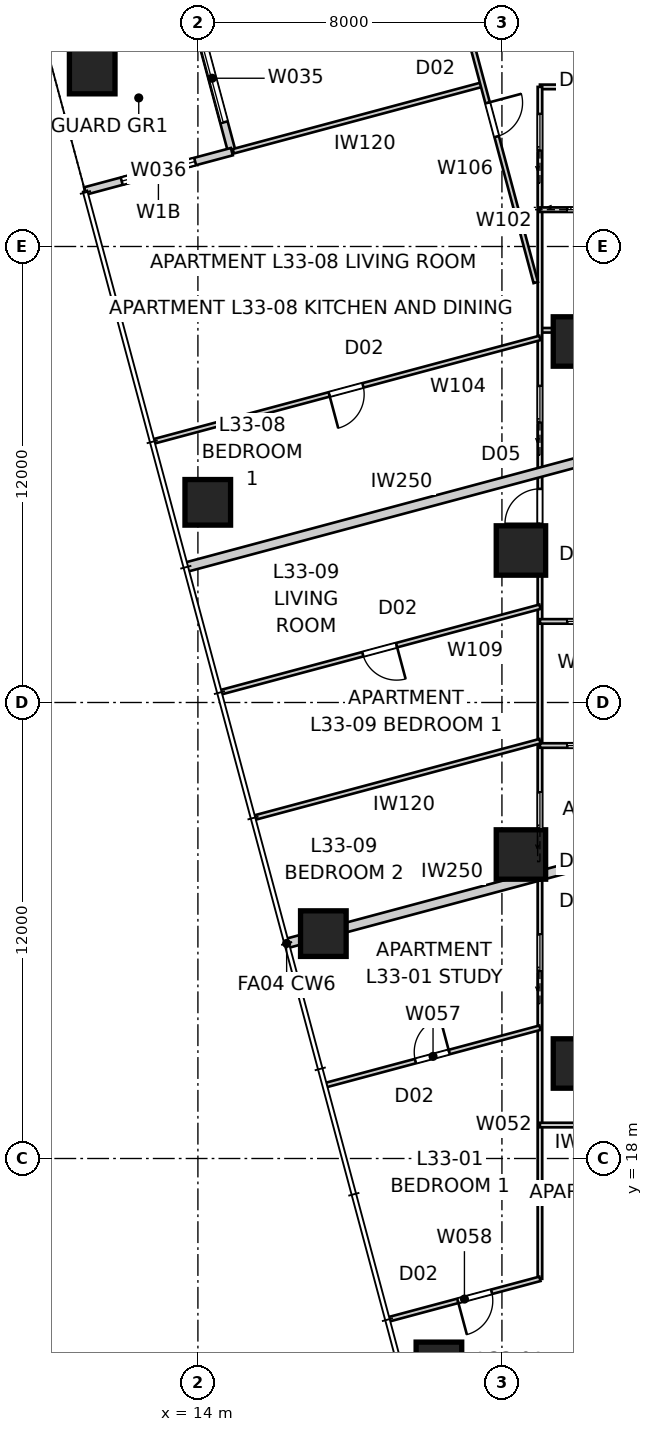
"""IFC4 building model, lengths in metres.
Left out: names, types, materials, properties, quantities, classifications, styles, units other than length and angle.
Written with IfcOpenShell. Run it as: python <this file> out.ifc"""

import sys

from ifc_helpers import new_model, si_unit, direction, frame, frame_2d, origin, origin_2d, place, context, subcontext, project, spatial, rectangle, extrude, element, fill, save


model = new_model("IFC4")
c1 = context("Model", 3, precision=1e-05, world=origin(), true_north=direction((0.0, 1.0)))
c2 = subcontext(c1, "Body", "Model", "MODEL_VIEW")
j1 = project(units=[si_unit("LENGTHUNIT", "METRE"), si_unit("PLANEANGLEUNIT", "RADIAN")], contexts=[c1])
p1 = place(None, origin())
s1 = spatial("IfcSite", under=j1, at=p1, CompositionType="ELEMENT")
p2 = place(p1, origin())
s2 = spatial("IfcBuilding", under=s1, at=p2, CompositionType="ELEMENT")
p3 = place(p2, frame((0.0, 0.0, 121.8)))
s3 = spatial("IfcBuildingStorey", under=s2, at=p3, CompositionType="ELEMENT", Elevation=121.8)
for number, where, z_axis, x_axis in (
    (1, (11.219, 46.617, 0.0), (0.0, 0.0, 1.0), (1.0, 0.0, 0.0)),
    (2, (14.26, 35.267, 0.0), (0.0, 0.0, 1.0), (1.0, 0.0, 0.0)),
    (3, (17.301, 23.918, 0.0), (0.0, 0.0, 1.0), (1.0, 0.0, 0.0)),
    (4, (20.342, 12.568, 0.0), (0.0, 0.0, 1.0), (1.0, 0.0, 0.0)),
):
    element("IfcColumn", number, at=place(p3, frame(where, z_axis=z_axis, x_axis=x_axis)), inside=s3, PredefinedType="COLUMN", context=c2, shape_type="SweptSolid", body=[
        extrude(rectangle(XDim=1.2, YDim=1.2, at=origin_2d()), origin(), (0.0, 0.0, 1.0), 3.4),
    ])
for number, where, z_axis, x_axis in (
    (5, (24.0, 39.5, 0.0), (0.0, 0.0, 1.0), (1.0, 0.0, 0.0)),
    (6, (22.5, 34.0, 0.0), (0.0, 0.0, 1.0), (1.0, 0.0, 0.0)),
    (7, (22.5, 26.0, 0.0), (0.0, 0.0, 1.0), (1.0, 0.0, 0.0)),
    (8, (24.0, 20.5, 0.0), (0.0, 0.0, 1.0), (1.0, 0.0, 0.0)),
):
    element("IfcColumn", number, at=place(p3, frame(where, z_axis=z_axis, x_axis=x_axis)), inside=s3, PredefinedType="COLUMN", context=c2, shape_type="SweptSolid", body=[
        extrude(rectangle(XDim=1.3, YDim=1.3, at=origin_2d()), origin(), (0.0, 0.0, 1.0), 3.4),
    ])
p4 = place(p3, frame((13.857, 48.359, 0.0), z_axis=(0.0, 0.0, 1.0), x_axis=(0.258843877716, -0.965919172068, 0.0)))
e9 = element("IfcWall", 9, at=p4, inside=s3, PredefinedType="SOLIDWALL", context=c2, shape_type="SweptSolid", body=[
    extrude(rectangle(XDim=4.0, YDim=0.2, at=frame_2d((2.0, 0.0))), origin(), (0.0, 0.0, 1.0), 3.25),
])
p5 = place(p4, frame((0.8, 0.0, 0.0)))
e10 = element("IfcOpeningElement", 10, at=p5, cuts=e9, PredefinedType="OPENING", context=c2, shape_type="SweptSolid", body=[
    extrude(rectangle(XDim=2.4, YDim=2.1, at=frame_2d((1.2, 1.05))), frame((0.0, 0.11, 0.0), z_axis=(0.0, -1.0, 0.0), x_axis=(1.0, 0.0, 0.0)), (0.0, 0.0, 1.0), 0.22),
])
p6 = place(p3, frame((14.893, 44.496, 0.0), z_axis=(0.0, 0.0, 1.0), x_axis=(-0.965934430412, -0.258786931944, 0.0)))
e11 = element("IfcWall", 11, at=p6, inside=s3, PredefinedType="SOLIDWALL", context=c2, shape_type="SweptSolid", body=[
    extrude(rectangle(XDim=4.0, YDim=0.2, at=frame_2d((2.0, 0.0))), origin(), (0.0, 0.0, 1.0), 3.25),
])
p7 = place(p6, frame((1.0, 0.0, 0.45)))
e12 = element("IfcOpeningElement", 12, at=p7, cuts=e11, PredefinedType="OPENING", context=c2, shape_type="SweptSolid", body=[
    extrude(rectangle(XDim=2.0, YDim=1.8, at=frame_2d((1.0, 0.9))), frame((0.0, 0.11, 0.0), z_axis=(0.0, -1.0, 0.0), x_axis=(1.0, 0.0, 0.0)), (0.0, 0.0, 1.0), 0.22),
])
p8 = place(p3, frame((23.758, 51.012, 0.0), z_axis=(0.0, 0.0, 1.0), x_axis=(0.258805213744, -0.965929532284, 0.0)))
e13 = element("IfcWall", 13, at=p8, inside=s3, PredefinedType="PARTITIONING", context=c2, shape_type="SweptSolid", body=[
    extrude(rectangle(XDim=7.473, YDim=0.25, at=frame_2d((3.737, 0.0))), origin(), (0.0, 0.0, 1.0), 3.25),
])
p9 = place(p3, frame((16.335, 23.659, 0.0), z_axis=(0.0, 0.0, 1.0), x_axis=(0.965927049013, 0.258814481793, 0.0)))
e14 = element("IfcWall", 14, at=p9, inside=s3, PredefinedType="PARTITIONING", context=c2, shape_type="SweptSolid", body=[
    extrude(rectangle(XDim=9.392, YDim=0.25, at=frame_2d((4.696, 0.0))), origin(), (0.0, 0.0, 1.0), 3.25),
])
p10 = place(p3, frame((13.682, 33.56, 0.0), z_axis=(0.0, 0.0, 1.0), x_axis=(0.965924438766, 0.258824223352, 0.0)))
e15 = element("IfcWall", 15, at=p10, inside=s3, PredefinedType="PARTITIONING", context=c2, shape_type="SweptSolid", body=[
    extrude(rectangle(XDim=12.138, YDim=0.25, at=frame_2d((6.069, 0.0))), origin(), (0.0, 0.0, 1.0), 3.25),
])
p11 = place(p3, frame((23.0, 14.833, 0.0), z_axis=(0.0, 0.0, 1.0), x_axis=(0.0, 1.0, 0.0)))
e16 = element("IfcWall", 16, at=p11, inside=s3, PredefinedType="PARTITIONING", context=c2, shape_type="SweptSolid", body=[
    extrude(rectangle(XDim=14.034, YDim=0.12, at=frame_2d((7.017, 0.0))), origin(), (0.0, 0.0, 1.0), 2.55),
])
p12 = place(p11, frame((11.843, 0.0, 0.0)))
e17 = element("IfcOpeningElement", 17, at=p12, cuts=e16, PredefinedType="OPENING", context=c2, shape_type="SweptSolid", body=[
    extrude(rectangle(XDim=0.96, YDim=2.1, at=frame_2d((0.48, 1.05))), frame((0.0, 0.07, 0.0), z_axis=(0.0, -1.0, 0.0), x_axis=(1.0, 0.0, 0.0)), (0.0, 0.0, 1.0), 0.14),
])
p13 = place(p11, frame((8.104, 0.0, 0.0)))
e18 = element("IfcOpeningElement", 18, at=p13, cuts=e16, PredefinedType="OPENING", context=c2, shape_type="SweptSolid", body=[
    extrude(rectangle(XDim=0.96, YDim=2.1, at=frame_2d((0.48, 1.05))), frame((0.0, 0.07, 0.0), z_axis=(0.0, -1.0, 0.0), x_axis=(1.0, 0.0, 0.0)), (0.0, 0.0, 1.0), 0.14),
])
p14 = place(p3, frame((25.4, 18.88, 0.0), z_axis=(0.0, 0.0, 1.0), x_axis=(-1.0, 0.0, 0.0)))
e19 = element("IfcWall", 19, at=p14, inside=s3, PredefinedType="PARTITIONING", context=c2, shape_type="SweptSolid", body=[
    extrude(rectangle(XDim=2.4, YDim=0.12, at=frame_2d((1.2, 0.0))), origin(), (0.0, 0.0, 1.0), 2.722),
])
p15 = place(p3, frame((19.911, 10.468, 0.0), z_axis=(0.0, 0.0, 1.0), x_axis=(0.965927203676, 0.25881390457, 0.0)))
e20 = element("IfcWall", 20, at=p15, inside=s3, PredefinedType="PARTITIONING", context=c2, shape_type="SweptSolid", body=[
    extrude(rectangle(XDim=9.357, YDim=0.12, at=frame_2d((4.678, 0.0))), origin(), (0.0, 0.0, 1.0), 2.638),
])
p16 = place(p15, frame((4.411, 0.0, 0.0)))
e21 = element("IfcOpeningElement", 21, at=p16, cuts=e20, PredefinedType="OPENING", context=c2, shape_type="SweptSolid", body=[
    extrude(rectangle(XDim=0.92, YDim=2.34, at=frame_2d((0.46, 1.17))), frame((0.0, 0.07, 0.0), z_axis=(0.0, -1.0, 0.0), x_axis=(1.0, 0.0, 0.0)), (0.0, 0.0, 1.0), 0.14),
])
p17 = place(p3, frame((17.374, 19.934, 0.0), z_axis=(0.0, 0.0, 1.0), x_axis=(0.965929528031, 0.258805229617, 0.0)))
e22 = element("IfcWall", 22, at=p17, inside=s3, PredefinedType="PARTITIONING", context=c2, shape_type="SweptSolid", body=[
    extrude(rectangle(XDim=5.824, YDim=0.12, at=frame_2d((2.912, 0.0))), origin(), (0.0, 0.0, 1.0), 3.25),
])
p18 = place(p17, frame((2.432, 0.0, 0.0)))
e23 = element("IfcOpeningElement", 23, at=p18, cuts=e22, PredefinedType="OPENING", context=c2, shape_type="SweptSolid", body=[
    extrude(rectangle(XDim=0.92, YDim=2.34, at=frame_2d((0.46, 1.17))), frame((0.0, 0.07, 0.0), z_axis=(0.0, -1.0, 0.0), x_axis=(1.0, 0.0, 0.0)), (0.0, 0.0, 1.0), 0.14),
])
p19 = place(p3, frame((23.0, 14.833, 0.0), z_axis=(0.0, 0.0, 1.0), x_axis=(-0.965927919062, -0.258811234642, 0.0)))
e24 = element("IfcWall", 24, at=p19, inside=s3, PredefinedType="PARTITIONING", context=c2, shape_type="SweptSolid", body=[
    extrude(rectangle(XDim=4.114, YDim=0.12, at=frame_2d((2.057, 0.0))), origin(), (0.0, 0.0, 1.0), 3.25),
])
p20 = place(p19, frame((1.317, 0.0, 0.0)))
e25 = element("IfcOpeningElement", 25, at=p20, cuts=e24, PredefinedType="OPENING", context=c2, shape_type="SweptSolid", body=[
    extrude(rectangle(XDim=0.92, YDim=2.34, at=frame_2d((0.46, 1.17))), frame((0.0, 0.07, 0.0), z_axis=(0.0, -1.0, 0.0), x_axis=(1.0, 0.0, 0.0)), (0.0, 0.0, 1.0), 0.14),
])
p21 = place(p3, frame((23.0, 46.2, 0.0), z_axis=(0.0, 0.0, 1.0), x_axis=(1.0, 0.0, 0.0)))
e26 = element("IfcWall", 26, at=p21, inside=s3, PredefinedType="PARTITIONING", context=c2, shape_type="SweptSolid", body=[
    extrude(rectangle(XDim=33.2, YDim=0.12, at=frame_2d((16.6, 0.0))), origin(), (0.0, 0.0, 1.0), 2.55),
])
p22 = place(p21, frame((5.844, 0.0, 0.0)))
e27 = element("IfcOpeningElement", 27, at=p22, cuts=e26, PredefinedType="OPENING", context=c2, shape_type="SweptSolid", body=[
    extrude(rectangle(XDim=0.92, YDim=2.34, at=frame_2d((0.46, 1.17))), frame((0.0, 0.07, 0.0), z_axis=(0.0, -1.0, 0.0), x_axis=(1.0, 0.0, 0.0)), (0.0, 0.0, 1.0), 0.14),
])
p23 = place(p21, frame((3.382, 0.0, 0.0)))
e28 = element("IfcOpeningElement", 28, at=p23, cuts=e26, PredefinedType="OPENING", context=c2, shape_type="SweptSolid", body=[
    extrude(rectangle(XDim=0.92, YDim=2.34, at=frame_2d((0.46, 1.17))), frame((0.0, 0.07, 0.0), z_axis=(0.0, -1.0, 0.0), x_axis=(1.0, 0.0, 0.0)), (0.0, 0.0, 1.0), 0.14),
])
p24 = place(p21, frame((9.452, 0.0, 0.0)))
e29 = element("IfcOpeningElement", 29, at=p24, cuts=e26, PredefinedType="OPENING", context=c2, shape_type="SweptSolid", body=[
    extrude(rectangle(XDim=0.92, YDim=2.34, at=frame_2d((0.46, 1.17))), frame((0.0, 0.07, 0.0), z_axis=(0.0, -1.0, 0.0), x_axis=(1.0, 0.0, 0.0)), (0.0, 0.0, 1.0), 0.14),
])
p25 = place(p21, frame((27.775, 0.0, 0.0)))
e30 = element("IfcOpeningElement", 30, at=p25, cuts=e26, PredefinedType="OPENING", context=c2, shape_type="SweptSolid", body=[
    extrude(rectangle(XDim=0.92, YDim=2.34, at=frame_2d((0.46, 1.17))), frame((0.0, 0.07, 0.0), z_axis=(0.0, -1.0, 0.0), x_axis=(1.0, 0.0, 0.0)), (0.0, 0.0, 1.0), 0.14),
])
p26 = place(p21, frame((15.05, 0.0, 0.0)))
e31 = element("IfcOpeningElement", 31, at=p26, cuts=e26, PredefinedType="OPENING", context=c2, shape_type="SweptSolid", body=[
    extrude(rectangle(XDim=0.96, YDim=2.1, at=frame_2d((0.48, 1.05))), frame((0.0, 0.07, 0.0), z_axis=(0.0, -1.0, 0.0), x_axis=(1.0, 0.0, 0.0)), (0.0, 0.0, 1.0), 0.14),
])
p27 = place(p3, frame((25.4, 39.795, 0.0), z_axis=(0.0, 0.0, 1.0), x_axis=(-1.0, 0.0, 0.0)))
e32 = element("IfcWall", 32, at=p27, inside=s3, PredefinedType="PARTITIONING", context=c2, shape_type="SweptSolid", body=[
    extrude(rectangle(XDim=2.4, YDim=0.12, at=frame_2d((1.2, 0.0))), origin(), (0.0, 0.0, 1.0), 3.25),
])
p28 = place(p3, frame((23.0, 28.93, 0.0), z_axis=(0.0, 0.0, 1.0), x_axis=(0.0, 1.0, 0.0)))
e33 = element("IfcWall", 33, at=p28, inside=s3, PredefinedType="PARTITIONING", context=c2, shape_type="SweptSolid", body=[
    extrude(rectangle(XDim=17.27, YDim=0.12, at=frame_2d((8.635, 0.0))), origin(), (0.0, 0.0, 1.0), 2.55),
])
p29 = place(p28, frame((5.772, 0.0, 0.0)))
e34 = element("IfcOpeningElement", 34, at=p29, cuts=e33, PredefinedType="OPENING", context=c2, shape_type="SweptSolid", body=[
    extrude(rectangle(XDim=0.92, YDim=2.34, at=frame_2d((0.46, 1.17))), frame((0.0, 0.07, 0.0), z_axis=(0.0, -1.0, 0.0), x_axis=(1.0, 0.0, 0.0)), (0.0, 0.0, 1.0), 0.14),
])
p30 = place(p28, frame((15.599, 0.0, 0.0)))
e35 = element("IfcOpeningElement", 35, at=p30, cuts=e33, PredefinedType="OPENING", context=c2, shape_type="SweptSolid", body=[
    extrude(rectangle(XDim=0.96, YDim=2.1, at=frame_2d((0.48, 1.05))), frame((0.0, 0.07, 0.0), z_axis=(0.0, -1.0, 0.0), x_axis=(1.0, 0.0, 0.0)), (0.0, 0.0, 1.0), 0.14),
])
p31 = place(p28, frame((8.441, 0.0, 0.0)))
e36 = element("IfcOpeningElement", 36, at=p31, cuts=e33, PredefinedType="OPENING", context=c2, shape_type="SweptSolid", body=[
    extrude(rectangle(XDim=0.96, YDim=2.1, at=frame_2d((0.48, 1.05))), frame((0.0, 0.07, 0.0), z_axis=(0.0, -1.0, 0.0), x_axis=(1.0, 0.0, 0.0)), (0.0, 0.0, 1.0), 0.14),
])
p32 = place(p3, frame((23.0, 42.968, 0.0), z_axis=(0.0, 0.0, 1.0), x_axis=(1.0, 0.0, 0.0)))
e37 = element("IfcWall", 37, at=p32, inside=s3, PredefinedType="PARTITIONING", context=c2, shape_type="SweptSolid", body=[
    extrude(rectangle(XDim=2.4, YDim=0.12, at=frame_2d((1.2, 0.0))), origin(), (0.0, 0.0, 1.0), 3.25),
])
p33 = place(p32, frame((0.72, 0.0, 0.0)))
e38 = element("IfcOpeningElement", 38, at=p33, cuts=e37, PredefinedType="OPENING", context=c2, shape_type="SweptSolid", body=[
    extrude(rectangle(XDim=0.96, YDim=2.1, at=frame_2d((0.48, 1.05))), frame((0.0, 0.07, 0.0), z_axis=(0.0, -1.0, 0.0), x_axis=(1.0, 0.0, 0.0)), (0.0, 0.0, 1.0), 0.14),
])
p34 = place(p3, frame((23.0, 39.594, 0.0), z_axis=(0.0, 0.0, 1.0), x_axis=(-0.9659257847, -0.258819200315, 0.0)))
e39 = element("IfcWall", 39, at=p34, inside=s3, PredefinedType="PARTITIONING", context=c2, shape_type="SweptSolid", body=[
    extrude(rectangle(XDim=10.522, YDim=0.12, at=frame_2d((5.261, 0.0))), origin(), (0.0, 0.0, 1.0), 2.722),
])
p35 = place(p34, frame((4.821, 0.0, 0.0)))
e40 = element("IfcOpeningElement", 40, at=p35, cuts=e39, PredefinedType="OPENING", context=c2, shape_type="SweptSolid", body=[
    extrude(rectangle(XDim=0.92, YDim=2.34, at=frame_2d((0.46, 1.17))), frame((0.0, 0.07, 0.0), z_axis=(0.0, -1.0, 0.0), x_axis=(1.0, 0.0, 0.0)), (0.0, 0.0, 1.0), 0.14),
])
p36 = place(p3, frame((14.931, 44.506, 0.0), z_axis=(0.0, 0.0, 1.0), x_axis=(0.965922865286, 0.258830095464, 0.0)))
e41 = element("IfcWall", 41, at=p36, inside=s3, PredefinedType="PARTITIONING", context=c2, shape_type="SweptSolid", body=[
    extrude(rectangle(XDim=6.793, YDim=0.12, at=frame_2d((3.396, 0.0))), origin(), (0.0, 0.0, 1.0), 3.25),
])
p37 = place(p3, frame((20.468, 50.089, 0.0), z_axis=(0.0, 0.0, 1.0), x_axis=(0.25881390457, -0.965927203676, 0.0)))
e42 = element("IfcWall", 42, at=p37, inside=s3, PredefinedType="PARTITIONING", context=c2, shape_type="SweptSolid", body=[
    extrude(rectangle(XDim=9.357, YDim=0.12, at=frame_2d((4.678, 0.0))), origin(), (0.0, 0.0, 1.0), 2.638),
])
p38 = place(p37, frame((4.461, 0.0, 0.0)))
e43 = element("IfcOpeningElement", 43, at=p38, cuts=e42, PredefinedType="OPENING", context=c2, shape_type="SweptSolid", body=[
    extrude(rectangle(XDim=0.92, YDim=2.34, at=frame_2d((0.46, 1.17))), frame((0.0, 0.07, 0.0), z_axis=(0.0, -1.0, 0.0), x_axis=(1.0, 0.0, 0.0)), (0.0, 0.0, 1.0), 0.14),
])
p39 = place(p37, frame((1.5, 0.0, 0.0)))
e44 = element("IfcOpeningElement", 44, at=p39, cuts=e42, PredefinedType="OPENING", context=c2, shape_type="SweptSolid", body=[
    extrude(rectangle(XDim=0.92, YDim=2.34, at=frame_2d((0.46, 1.17))), frame((0.0, 0.07, 0.0), z_axis=(0.0, -1.0, 0.0), x_axis=(1.0, 0.0, 0.0)), (0.0, 0.0, 1.0), 0.14),
])
p40 = place(p3, frame((25.4, 32.134, 0.0), z_axis=(0.0, 0.0, 1.0), x_axis=(-1.0, 0.0, 0.0)))
e45 = element("IfcWall", 45, at=p40, inside=s3, PredefinedType="PARTITIONING", context=c2, shape_type="SweptSolid", body=[
    extrude(rectangle(XDim=2.4, YDim=0.12, at=frame_2d((1.2, 0.0))), origin(), (0.0, 0.0, 1.0), 3.25),
])
p41 = place(p40, frame((0.72, 0.0, 0.0)))
e46 = element("IfcOpeningElement", 46, at=p41, cuts=e45, PredefinedType="OPENING", context=c2, shape_type="SweptSolid", body=[
    extrude(rectangle(XDim=0.96, YDim=2.1, at=frame_2d((0.48, 1.05))), frame((0.0, 0.07, 0.0), z_axis=(0.0, -1.0, 0.0), x_axis=(1.0, 0.0, 0.0)), (0.0, 0.0, 1.0), 0.14),
])
p42 = place(p3, frame((25.4, 28.868, 0.0), z_axis=(0.0, 0.0, 1.0), x_axis=(-1.0, 0.0, 0.0)))
e47 = element("IfcWall", 47, at=p42, inside=s3, PredefinedType="PARTITIONING", context=c2, shape_type="SweptSolid", body=[
    extrude(rectangle(XDim=2.4, YDim=0.12, at=frame_2d((1.2, 0.0))), origin(), (0.0, 0.0, 1.0), 3.25),
])
p43 = place(p42, frame((0.72, 0.0, 0.0)))
e48 = element("IfcOpeningElement", 48, at=p43, cuts=e47, PredefinedType="OPENING", context=c2, shape_type="SweptSolid", body=[
    extrude(rectangle(XDim=0.96, YDim=2.1, at=frame_2d((0.48, 1.05))), frame((0.0, 0.07, 0.0), z_axis=(0.0, -1.0, 0.0), x_axis=(1.0, 0.0, 0.0)), (0.0, 0.0, 1.0), 0.14),
])
p44 = place(p3, frame((23.0, 32.519, 0.0), z_axis=(0.0, 0.0, 1.0), x_axis=(-0.965925607751, -0.258819860698, 0.0)))
e49 = element("IfcWall", 49, at=p44, inside=s3, PredefinedType="PARTITIONING", context=c2, shape_type="SweptSolid", body=[
    extrude(rectangle(XDim=8.691, YDim=0.12, at=frame_2d((4.346, 0.0))), origin(), (0.0, 0.0, 1.0), 3.25),
])
p45 = place(p44, frame((3.906, 0.0, 0.0)))
e50 = element("IfcOpeningElement", 50, at=p45, cuts=e49, PredefinedType="OPENING", context=c2, shape_type="SweptSolid", body=[
    extrude(rectangle(XDim=0.92, YDim=2.34, at=frame_2d((0.46, 1.17))), frame((0.0, 0.07, 0.0), z_axis=(0.0, -1.0, 0.0), x_axis=(1.0, 0.0, 0.0)), (0.0, 0.0, 1.0), 0.14),
])
p46 = place(p3, frame((23.0, 28.982, 0.0), z_axis=(0.0, 0.0, 1.0), x_axis=(-0.965927309482, -0.258813509689, 0.0)))
e51 = element("IfcWall", 51, at=p46, inside=s3, PredefinedType="PARTITIONING", context=c2, shape_type="SweptSolid", body=[
    extrude(rectangle(XDim=7.776, YDim=0.12, at=frame_2d((3.888, 0.0))), origin(), (0.0, 0.0, 1.0), 3.25),
])
p47 = place(p5, origin())
e52 = element("IfcDoor", 52, at=p47, inside=s3, OperationType="SLIDING_TO_LEFT", PredefinedType="DOOR", context=c2, shape_type="SweptSolid", body=[
    extrude(rectangle(XDim=2.4, YDim=2.1, at=frame_2d((1.2, 1.05))), frame((0.0, 0.025, 0.0), z_axis=(0.0, -1.0, 0.0), x_axis=(1.0, 0.0, 0.0)), (0.0, 0.0, 1.0), 0.05),
])
fill(e10, e52)
p48 = place(p7, origin())
e53 = element("IfcWindow", 53, at=p48, inside=s3, PartitioningType="SINGLE_PANEL", PredefinedType="WINDOW", context=c2, shape_type="SweptSolid", body=[
    extrude(rectangle(XDim=2.0, YDim=1.8, at=frame_2d((1.0, 0.9))), frame((0.0, 0.03, 0.0), z_axis=(0.0, -1.0, 0.0), x_axis=(1.0, 0.0, 0.0)), (0.0, 0.0, 1.0), 0.06),
])
fill(e12, e53)
p49 = place(p29, origin())
e54 = element("IfcDoor", 54, at=p49, inside=s3, OperationType="SINGLE_SWING_LEFT", PredefinedType="DOOR", context=c2, shape_type="SweptSolid", body=[
    extrude(rectangle(XDim=0.92, YDim=2.34, at=frame_2d((0.46, 1.17))), frame((0.0, 0.025, 0.0), z_axis=(0.0, -1.0, 0.0), x_axis=(1.0, 0.0, 0.0)), (0.0, 0.0, 1.0), 0.05),
])
fill(e34, e54)
p50 = place(p41, origin())
e55 = element("IfcDoor", 55, at=p50, inside=s3, OperationType="SLIDING_TO_LEFT", PredefinedType="DOOR", context=c2, shape_type="SweptSolid", body=[
    extrude(rectangle(XDim=0.96, YDim=2.1, at=frame_2d((0.48, 1.05))), frame((0.0, 0.025, 0.0), z_axis=(0.0, -1.0, 0.0), x_axis=(1.0, 0.0, 0.0)), (0.0, 0.0, 1.0), 0.05),
])
fill(e46, e55)
p51 = place(p33, origin())
e56 = element("IfcDoor", 56, at=p51, inside=s3, OperationType="SLIDING_TO_LEFT", PredefinedType="DOOR", context=c2, shape_type="SweptSolid", body=[
    extrude(rectangle(XDim=0.96, YDim=2.1, at=frame_2d((0.48, 1.05))), frame((0.0, 0.025, 0.0), z_axis=(0.0, -1.0, 0.0), x_axis=(1.0, 0.0, 0.0)), (0.0, 0.0, 1.0), 0.05),
])
fill(e38, e56)
p52 = place(p20, origin())
e57 = element("IfcDoor", 57, at=p52, inside=s3, OperationType="SINGLE_SWING_RIGHT", PredefinedType="DOOR", context=c2, shape_type="SweptSolid", body=[
    extrude(rectangle(XDim=0.92, YDim=2.34, at=frame_2d((0.46, 1.17))), frame((0.0, 0.025, 0.0), z_axis=(0.0, -1.0, 0.0), x_axis=(1.0, 0.0, 0.0)), (0.0, 0.0, 1.0), 0.05),
])
fill(e25, e57)
p53 = place(p45, origin())
e58 = element("IfcDoor", 58, at=p53, inside=s3, OperationType="SINGLE_SWING_LEFT", PredefinedType="DOOR", context=c2, shape_type="SweptSolid", body=[
    extrude(rectangle(XDim=0.92, YDim=2.34, at=frame_2d((0.46, 1.17))), frame((0.0, 0.025, 0.0), z_axis=(0.0, -1.0, 0.0), x_axis=(1.0, 0.0, 0.0)), (0.0, 0.0, 1.0), 0.05),
])
fill(e50, e58)
p54 = place(p43, origin())
e59 = element("IfcDoor", 59, at=p54, inside=s3, OperationType="SLIDING_TO_LEFT", PredefinedType="DOOR", context=c2, shape_type="SweptSolid", body=[
    extrude(rectangle(XDim=0.96, YDim=2.1, at=frame_2d((0.48, 1.05))), frame((0.0, 0.025, 0.0), z_axis=(0.0, -1.0, 0.0), x_axis=(1.0, 0.0, 0.0)), (0.0, 0.0, 1.0), 0.05),
])
fill(e48, e59)
p55 = place(p30, origin())
e60 = element("IfcDoor", 60, at=p55, inside=s3, OperationType="SLIDING_TO_LEFT", PredefinedType="DOOR", context=c2, shape_type="SweptSolid", body=[
    extrude(rectangle(XDim=0.96, YDim=2.1, at=frame_2d((0.48, 1.05))), frame((0.0, 0.025, 0.0), z_axis=(0.0, -1.0, 0.0), x_axis=(1.0, 0.0, 0.0)), (0.0, 0.0, 1.0), 0.05),
])
fill(e35, e60)
p56 = place(p12, origin())
e61 = element("IfcDoor", 61, at=p56, inside=s3, OperationType="SLIDING_TO_LEFT", PredefinedType="DOOR", context=c2, shape_type="SweptSolid", body=[
    extrude(rectangle(XDim=0.96, YDim=2.1, at=frame_2d((0.48, 1.05))), frame((0.0, 0.025, 0.0), z_axis=(0.0, -1.0, 0.0), x_axis=(1.0, 0.0, 0.0)), (0.0, 0.0, 1.0), 0.05),
])
fill(e17, e61)
p57 = place(p18, origin())
e62 = element("IfcDoor", 62, at=p57, inside=s3, OperationType="SINGLE_SWING_RIGHT", PredefinedType="DOOR", context=c2, shape_type="SweptSolid", body=[
    extrude(rectangle(XDim=0.92, YDim=2.34, at=frame_2d((0.46, 1.17))), frame((0.0, 0.025, 0.0), z_axis=(0.0, -1.0, 0.0), x_axis=(1.0, 0.0, 0.0)), (0.0, 0.0, 1.0), 0.05),
])
fill(e23, e62)
p58 = place(p13, origin())
e63 = element("IfcDoor", 63, at=p58, inside=s3, OperationType="SLIDING_TO_LEFT", PredefinedType="DOOR", context=c2, shape_type="SweptSolid", body=[
    extrude(rectangle(XDim=0.96, YDim=2.1, at=frame_2d((0.48, 1.05))), frame((0.0, 0.025, 0.0), z_axis=(0.0, -1.0, 0.0), x_axis=(1.0, 0.0, 0.0)), (0.0, 0.0, 1.0), 0.05),
])
fill(e18, e63)
p59 = place(p38, origin())
e64 = element("IfcDoor", 64, at=p59, inside=s3, OperationType="SINGLE_SWING_LEFT", PredefinedType="DOOR", context=c2, shape_type="SweptSolid", body=[
    extrude(rectangle(XDim=0.92, YDim=2.34, at=frame_2d((0.46, 1.17))), frame((0.0, 0.025, 0.0), z_axis=(0.0, -1.0, 0.0), x_axis=(1.0, 0.0, 0.0)), (0.0, 0.0, 1.0), 0.05),
])
fill(e43, e64)
p60 = place(p35, origin())
e65 = element("IfcDoor", 65, at=p60, inside=s3, OperationType="SINGLE_SWING_RIGHT", PredefinedType="DOOR", context=c2, shape_type="SweptSolid", body=[
    extrude(rectangle(XDim=0.92, YDim=2.34, at=frame_2d((0.46, 1.17))), frame((0.0, 0.025, 0.0), z_axis=(0.0, -1.0, 0.0), x_axis=(1.0, 0.0, 0.0)), (0.0, 0.0, 1.0), 0.05),
])
fill(e40, e65)
p61 = place(p31, origin())
e66 = element("IfcDoor", 66, at=p61, inside=s3, OperationType="SLIDING_TO_LEFT", PredefinedType="DOOR", context=c2, shape_type="SweptSolid", body=[
    extrude(rectangle(XDim=0.96, YDim=2.1, at=frame_2d((0.48, 1.05))), frame((0.0, 0.025, 0.0), z_axis=(0.0, -1.0, 0.0), x_axis=(1.0, 0.0, 0.0)), (0.0, 0.0, 1.0), 0.05),
])
fill(e36, e66)
save(model, sys.argv[1])
